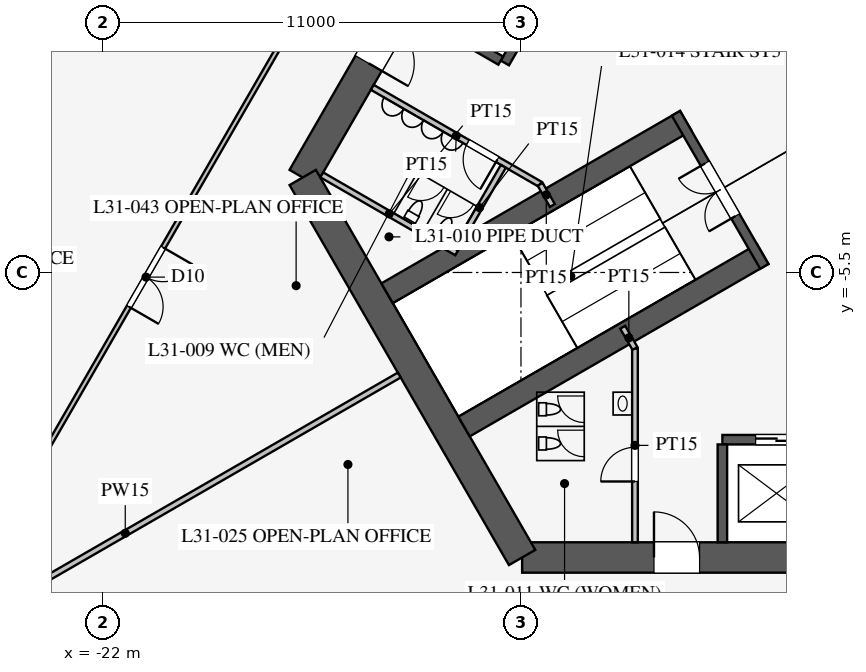
"""IFC4 building model, lengths in metres.
Left out: names, types, materials, properties, quantities, classifications, styles, units other than length and angle.
Written with IfcOpenShell. Run it as: python <this file> out.ifc"""

import sys

from ifc_helpers import new_model, si_unit, direction, frame, frame_2d, origin, place, context, subcontext, project, spatial, rectangle, extrude, element, fill, save


model = new_model("IFC4")
c1 = context("Model", 3, precision=1e-05, world=origin(), true_north=direction((0.0, 1.0)))
c2 = subcontext(c1, "Body", "Model", "MODEL_VIEW")
j1 = project(units=[si_unit("LENGTHUNIT", "METRE"), si_unit("PLANEANGLEUNIT", "RADIAN")], contexts=[c1])
p1 = place(None, origin())
s1 = spatial("IfcSite", under=j1, at=p1, CompositionType="ELEMENT")
p2 = place(p1, origin())
s2 = spatial("IfcBuilding", under=s1, at=p2, CompositionType="ELEMENT")
p3 = place(p2, frame((0.0, 0.0, 136.7)))
s3 = spatial("IfcBuildingStorey", under=s2, at=p3, CompositionType="ELEMENT", Elevation=136.7)
p4 = place(p3, frame((-10.97, -13.0, 0.0), z_axis=(0.0, 0.0, 1.0), x_axis=(1.0, 0.0, 0.0)))
e1 = element("IfcWall", 1, at=p4, inside=s3, PredefinedType="SHEAR", context=c2, shape_type="SweptSolid", body=[
    extrude(rectangle(XDim=21.939, YDim=0.8, at=frame_2d((10.97, 0.0))), origin(), (0.0, 0.0, 1.0), 4.2),
])
p5 = place(p4, frame((17.27, 0.0, 0.0)))
e2 = element("IfcOpeningElement", 2, at=p5, cuts=e1, PredefinedType="OPENING", context=c2, shape_type="SweptSolid", body=[
    extrude(rectangle(XDim=1.2, YDim=2.1, at=frame_2d((0.6, 1.05))), frame((0.0, 0.41, 0.0), z_axis=(0.0, -1.0, 0.0), x_axis=(1.0, 0.0, 0.0)), (0.0, 0.0, 1.0), 0.82),
])
p6 = place(p4, frame((3.47, 0.0, 0.0)))
e3 = element("IfcOpeningElement", 3, at=p6, cuts=e1, PredefinedType="OPENING", context=c2, shape_type="SweptSolid", body=[
    extrude(rectangle(XDim=1.2, YDim=2.1, at=frame_2d((0.6, 1.05))), frame((0.0, 0.41, 0.0), z_axis=(0.0, -1.0, 0.0), x_axis=(1.0, 0.0, 0.0)), (0.0, 0.0, 1.0), 0.82),
])
p7 = place(p3, frame((-5.773, 16.0, 0.0), z_axis=(0.0, 0.0, 1.0), x_axis=(-0.500002442456, -0.866023993627, 0.0)))
e4 = element("IfcWall", 4, at=p7, inside=s3, PredefinedType="SHEAR", context=c2, shape_type="SweptSolid", body=[
    extrude(rectangle(XDim=21.939, YDim=0.8, at=frame_2d((10.97, 0.0))), origin(), (0.0, 0.0, 1.0), 4.2),
])
p8 = place(p7, frame((17.27, 0.0, 0.0)))
e5 = element("IfcOpeningElement", 5, at=p8, cuts=e4, PredefinedType="OPENING", context=c2, shape_type="SweptSolid", body=[
    extrude(rectangle(XDim=1.2, YDim=2.1, at=frame_2d((0.6, 1.05))), frame((0.0, 0.41, 0.0), z_axis=(0.0, -1.0, 0.0), x_axis=(1.0, 0.0, 0.0)), (0.0, 0.0, 1.0), 0.82),
])
p9 = place(p7, frame((3.47, 0.0, 0.0)))
e6 = element("IfcOpeningElement", 6, at=p9, cuts=e4, PredefinedType="OPENING", context=c2, shape_type="SweptSolid", body=[
    extrude(rectangle(XDim=1.2, YDim=2.1, at=frame_2d((0.6, 1.05))), frame((0.0, 0.41, 0.0), z_axis=(0.0, -1.0, 0.0), x_axis=(1.0, 0.0, 0.0)), (0.0, 0.0, 1.0), 0.82),
])
p10 = place(p3, frame((-16.743, -3.0, 0.0), z_axis=(0.0, 0.0, 1.0), x_axis=(0.499995765644, -0.866027848477, 0.0)))
e7 = element("IfcWall", 7, at=p10, inside=s3, PredefinedType="SHEAR", context=c2, shape_type="SweptSolid", body=[
    extrude(rectangle(XDim=11.547, YDim=0.8, at=frame_2d((5.773, 0.0))), origin(), (0.0, 0.0, 1.0), 4.2),
])
p11 = place(p3, frame((-5.7, -9.9, 0.0), z_axis=(0.0, 0.0, 1.0), x_axis=(1.0, 0.0, 0.0)))
e8 = element("IfcWall", 8, at=p11, inside=s3, PredefinedType="SHEAR", context=c2, shape_type="SweptSolid", body=[
    extrude(rectangle(XDim=11.4, YDim=0.25, at=frame_2d((5.7, 0.0))), origin(), (0.0, 0.0, 1.0), 4.2),
])
p12 = place(p11, frame((0.875, 0.0, 0.0)))
e9 = element("IfcOpeningElement", 9, at=p12, cuts=e8, PredefinedType="OPENING", context=c2, shape_type="SweptSolid", body=[
    extrude(rectangle(XDim=1.1, YDim=2.2, at=frame_2d((0.55, 1.1))), frame((0.0, 0.135, 0.0), z_axis=(0.0, -1.0, 0.0), x_axis=(1.0, 0.0, 0.0)), (0.0, 0.0, 1.0), 0.27),
])
p13 = place(p11, frame((3.725, 0.0, 0.0)))
e10 = element("IfcOpeningElement", 10, at=p13, cuts=e8, PredefinedType="OPENING", context=c2, shape_type="SweptSolid", body=[
    extrude(rectangle(XDim=1.1, YDim=2.2, at=frame_2d((0.55, 1.1))), frame((0.0, 0.135, 0.0), z_axis=(0.0, -1.0, 0.0), x_axis=(1.0, 0.0, 0.0)), (0.0, 0.0, 1.0), 0.27),
])
p14 = place(p11, frame((6.575, 0.0, 0.0)))
e11 = element("IfcOpeningElement", 11, at=p14, cuts=e8, PredefinedType="OPENING", context=c2, shape_type="SweptSolid", body=[
    extrude(rectangle(XDim=1.1, YDim=2.2, at=frame_2d((0.55, 1.1))), frame((0.0, 0.135, 0.0), z_axis=(0.0, -1.0, 0.0), x_axis=(1.0, 0.0, 0.0)), (0.0, 0.0, 1.0), 0.27),
])
p15 = place(p11, frame((9.425, 0.0, 0.0)))
e12 = element("IfcOpeningElement", 12, at=p15, cuts=e8, PredefinedType="OPENING", context=c2, shape_type="SweptSolid", body=[
    extrude(rectangle(XDim=1.1, YDim=2.2, at=frame_2d((0.55, 1.1))), frame((0.0, 0.135, 0.0), z_axis=(0.0, -1.0, 0.0), x_axis=(1.0, 0.0, 0.0)), (0.0, 0.0, 1.0), 0.27),
])
p16 = place(p3, frame((-5.7, -10.025, 0.0), z_axis=(0.0, 0.0, 1.0), x_axis=(0.0, -1.0, 0.0)))
e13 = element("IfcWall", 13, at=p16, inside=s3, PredefinedType="SHEAR", context=c2, shape_type="SweptSolid", body=[
    extrude(rectangle(XDim=2.575, YDim=0.25, at=frame_2d((1.288, 0.0))), origin(), (0.0, 0.0, 1.0), 4.2),
])
p17 = place(p3, frame((-5.724, 9.886, 0.0), z_axis=(0.0, 0.0, 1.0), x_axis=(-0.500001763848, -0.866024385424, 0.0)))
e14 = element("IfcWall", 14, at=p17, inside=s3, PredefinedType="SHEAR", context=c2, shape_type="SweptSolid", body=[
    extrude(rectangle(XDim=11.4, YDim=0.25, at=frame_2d((5.7, 0.0))), origin(), (0.0, 0.0, 1.0), 4.2),
])
p18 = place(p17, frame((6.525, 0.0, 0.0)))
e15 = element("IfcOpeningElement", 15, at=p18, cuts=e14, PredefinedType="OPENING", context=c2, shape_type="SweptSolid", body=[
    extrude(rectangle(XDim=1.2, YDim=2.2, at=frame_2d((0.6, 1.1))), frame((0.0, 0.135, 0.0), z_axis=(0.0, -1.0, 0.0), x_axis=(1.0, 0.0, 0.0)), (0.0, 0.0, 1.0), 0.27),
])
p19 = place(p17, frame((9.375, 0.0, 0.0)))
e16 = element("IfcOpeningElement", 16, at=p19, cuts=e14, PredefinedType="OPENING", context=c2, shape_type="SweptSolid", body=[
    extrude(rectangle(XDim=1.2, YDim=2.2, at=frame_2d((0.6, 1.1))), frame((0.0, 0.135, 0.0), z_axis=(0.0, -1.0, 0.0), x_axis=(1.0, 0.0, 0.0)), (0.0, 0.0, 1.0), 0.27),
])
p20 = place(p3, frame((-11.532, 0.076, 0.0), z_axis=(0.0, 0.0, 1.0), x_axis=(-0.866005588531, 0.500034319456, 0.0)))
e17 = element("IfcWall", 17, at=p20, inside=s3, PredefinedType="SHEAR", context=c2, shape_type="SweptSolid", body=[
    extrude(rectangle(XDim=2.575, YDim=0.25, at=frame_2d((1.288, 0.0))), origin(), (0.0, 0.0, 1.0), 4.2),
])
for number, where, z_axis, x_axis in (
    (18, (-6.663, -1.509, 0.0), (0.0, 0.0, 1.0), (-0.866, -0.5, 0.0)),
    (19, (-4.638, -5.016, 0.0), (0.0, 0.0, 1.0), (-0.866, -0.5, 0.0)),
):
    element("IfcWall", number, at=place(p3, frame(where, z_axis=z_axis, x_axis=x_axis)), inside=s3, PredefinedType="SHEAR", context=c2, shape_type="SweptSolid", body=[
        extrude(rectangle(XDim=9.075, YDim=0.6, at=frame_2d((4.538, 0.0))), origin(), (0.0, 0.0, 1.0), 4.2),
    ])
p21 = place(p3, frame((-6.922, -1.312, 0.0), z_axis=(0.0, 0.0, 1.0), x_axis=(0.499984536904, -0.866034331223, 0.0)))
e20 = element("IfcWall", 20, at=p21, inside=s3, PredefinedType="SHEAR", context=c2, shape_type="SweptSolid", body=[
    extrude(rectangle(XDim=4.65, YDim=0.25, at=frame_2d((2.325, 0.0))), origin(), (0.0, 0.0, 1.0), 4.2),
])
p22 = place(p21, frame((1.525, 0.0, 0.0)))
e21 = element("IfcOpeningElement", 21, at=p22, cuts=e20, PredefinedType="OPENING", context=c2, shape_type="SweptSolid", body=[
    extrude(rectangle(XDim=1.6, YDim=2.1, at=frame_2d((0.8, 1.05))), frame((0.0, 0.135, 0.0), z_axis=(0.0, -1.0, 0.0), x_axis=(1.0, 0.0, 0.0)), (0.0, 0.0, 1.0), 0.27),
])
p23 = place(p3, frame((-8.0, -7.5, 0.0), z_axis=(0.0, 0.0, 1.0), x_axis=(0.0, -1.0, 0.0)))
e22 = element("IfcWall", 22, at=p23, inside=s3, PredefinedType="PARTITIONING", context=c2, shape_type="SweptSolid", body=[
    extrude(rectangle(XDim=5.1, YDim=0.15, at=frame_2d((2.55, 0.0))), origin(), (0.0, 0.0, 1.0), 4.0),
])
p24 = place(p23, frame((2.6, 0.0, 0.0)))
e23 = element("IfcOpeningElement", 23, at=p24, cuts=e22, PredefinedType="OPENING", context=c2, shape_type="SweptSolid", body=[
    extrude(rectangle(XDim=0.9, YDim=2.1, at=frame_2d((0.45, 1.05))), frame((0.0, 0.085, 0.0), z_axis=(0.0, -1.0, 0.0), x_axis=(1.0, 0.0, 0.0)), (0.0, 0.0, 1.0), 0.17),
])
p25 = place(p3, frame((-10.495, -3.178, 0.0), z_axis=(0.0, 0.0, 1.0), x_axis=(-0.86602216432, 0.500005610874, 0.0)))
e24 = element("IfcWall", 24, at=p25, inside=s3, PredefinedType="PARTITIONING", context=c2, shape_type="SweptSolid", body=[
    extrude(rectangle(XDim=5.1, YDim=0.15, at=frame_2d((2.55, 0.0))), origin(), (0.0, 0.0, 1.0), 4.0),
])
p26 = place(p25, frame((1.3, 0.0, 0.0)))
e25 = element("IfcOpeningElement", 25, at=p26, cuts=e24, PredefinedType="OPENING", context=c2, shape_type="SweptSolid", body=[
    extrude(rectangle(XDim=0.9, YDim=2.1, at=frame_2d((0.45, 1.05))), frame((0.0, 0.085, 0.0), z_axis=(0.0, -1.0, 0.0), x_axis=(1.0, 0.0, 0.0)), (0.0, 0.0, 1.0), 0.17),
])
for number, where, z_axis, x_axis in (
    (26, (-10.495, -3.178, 0.0), (0.0, 0.0, 1.0), (0.5, -0.866, 0.0)),
    (27, (-8.0, -7.5, 0.0), (0.0, 0.0, 1.0), (-0.5, 0.866, 0.0)),
):
    element("IfcWall", number, at=place(p3, frame(where, z_axis=z_axis, x_axis=x_axis)), inside=s3, PredefinedType="PARTITIONING", context=c2, shape_type="SweptSolid", body=[
        extrude(rectangle(XDim=0.645, YDim=0.15, at=frame_2d((0.323, 0.0))), origin(), (0.0, 0.0, 1.0), 4.0),
    ])
p27 = place(p3, frame((-12.691, -4.982, 0.0), z_axis=(0.0, 0.0, 1.0), x_axis=(-0.8660249478, 0.500000789788, 0.0)))
e28 = element("IfcWall", 28, at=p27, inside=s3, PredefinedType="PARTITIONING", context=c2, shape_type="SweptSolid", body=[
    extrude(rectangle(XDim=4.1, YDim=0.15, at=frame_2d((2.05, 0.0))), origin(), (0.0, 0.0, 1.0), 4.0),
])
p28 = place(p3, frame((-11.464, -2.706, 0.0), z_axis=(0.0, 0.0, 1.0), x_axis=(-0.50001992892, -0.866013897511, 0.0)))
e29 = element("IfcWall", 29, at=p28, inside=s3, PredefinedType="PARTITIONING", context=c2, shape_type="SweptSolid", body=[
    extrude(rectangle(XDim=2.51, YDim=0.15, at=frame_2d((1.255, 0.0))), origin(), (0.0, 0.0, 1.0), 4.0),
])
p29 = place(p3, frame((-14.203, -8.2, 0.0), z_axis=(0.0, 0.0, 1.0), x_axis=(-0.866024668836, -0.500001272966, 0.0)))
e30 = element("IfcWall", 30, at=p29, inside=s3, PredefinedType="PARTITIONING", context=c2, shape_type="SweptSolid", body=[
    extrude(rectangle(XDim=16.65, YDim=0.15, at=frame_2d((8.325, 0.0))), origin(), (0.0, 0.0, 1.0), 2.3),
])
p30 = place(p3, frame((-0.016, 30.491, 0.0), z_axis=(0.0, 0.0, 1.0), x_axis=(-0.50000091641, -0.866024874695, 0.0)))
e31 = element("IfcWall", 31, at=p30, inside=s3, PredefinedType="PARTITIONING", context=c2, shape_type="SweptSolid", body=[
    extrude(rectangle(XDim=52.796, YDim=0.12, at=frame_2d((26.398, 0.0))), origin(), (0.0, 0.0, 1.0), 2.9),
])
p31 = place(p30, frame((10.2, 0.0, 0.15)))
e32 = element("IfcOpeningElement", 32, at=p31, cuts=e31, PredefinedType="OPENING", context=c2, shape_type="SweptSolid", body=[
    extrude(rectangle(XDim=1.8, YDim=2.1, at=frame_2d((0.9, 1.05))), frame((0.0, 0.07, 0.0), z_axis=(0.0, -1.0, 0.0), x_axis=(1.0, 0.0, 0.0)), (0.0, 0.0, 1.0), 0.14),
])
p32 = place(p30, frame((40.8, 0.0, 0.15)))
e33 = element("IfcOpeningElement", 33, at=p32, cuts=e31, PredefinedType="OPENING", context=c2, shape_type="SweptSolid", body=[
    extrude(rectangle(XDim=1.8, YDim=2.1, at=frame_2d((0.9, 1.05))), frame((0.0, 0.07, 0.0), z_axis=(0.0, -1.0, 0.0), x_axis=(1.0, 0.0, 0.0)), (0.0, 0.0, 1.0), 0.14),
])
p33 = place(p24, frame((0.9, 0.0, 0.0), z_axis=(0.0, 0.0, 1.0), x_axis=(-1.0, 0.0, 0.0)))
e34 = element("IfcDoor", 34, at=p33, inside=s3, OperationType="SINGLE_SWING_LEFT", PredefinedType="DOOR", context=c2, shape_type="SweptSolid", body=[
    extrude(rectangle(XDim=0.9, YDim=2.1, at=frame_2d((0.45, 1.05))), frame((0.0, 0.025, 0.0), z_axis=(0.0, -1.0, 0.0), x_axis=(1.0, 0.0, 0.0)), (0.0, 0.0, 1.0), 0.05),
])
fill(e23, e34)
p34 = place(p26, origin())
e35 = element("IfcDoor", 35, at=p34, inside=s3, OperationType="SINGLE_SWING_LEFT", PredefinedType="DOOR", context=c2, shape_type="SweptSolid", body=[
    extrude(rectangle(XDim=0.9, YDim=2.1, at=frame_2d((0.45, 1.05))), frame((0.0, 0.025, 0.0), z_axis=(0.0, -1.0, 0.0), x_axis=(1.0, 0.0, 0.0)), (0.0, 0.0, 1.0), 0.05),
])
fill(e25, e35)
p35 = place(p22, frame((1.6, 0.0, 0.0), z_axis=(0.0, 0.0, 1.0), x_axis=(-1.0, 0.0, 0.0)))
e36 = element("IfcDoor", 36, at=p35, inside=s3, OperationType="DOUBLE_DOOR_SINGLE_SWING", PredefinedType="DOOR", context=c2, shape_type="SweptSolid", body=[
    extrude(rectangle(XDim=1.6, YDim=2.1, at=frame_2d((0.8, 1.05))), frame((0.0, 0.025, 0.0), z_axis=(0.0, -1.0, 0.0), x_axis=(1.0, 0.0, 0.0)), (0.0, 0.0, 1.0), 0.05),
])
fill(e21, e36)
p36 = place(p6, origin())
e37 = element("IfcDoor", 37, at=p36, inside=s3, OperationType="SINGLE_SWING_LEFT", PredefinedType="DOOR", context=c2, shape_type="SweptSolid", body=[
    extrude(rectangle(XDim=1.2, YDim=2.1, at=frame_2d((0.6, 1.05))), frame((0.0, 0.025, 0.0), z_axis=(0.0, -1.0, 0.0), x_axis=(1.0, 0.0, 0.0)), (0.0, 0.0, 1.0), 0.05),
])
fill(e3, e37)
p37 = place(p8, origin())
e38 = element("IfcDoor", 38, at=p37, inside=s3, OperationType="SINGLE_SWING_RIGHT", PredefinedType="DOOR", context=c2, shape_type="SweptSolid", body=[
    extrude(rectangle(XDim=1.2, YDim=2.1, at=frame_2d((0.6, 1.05))), frame((0.0, 0.025, 0.0), z_axis=(0.0, -1.0, 0.0), x_axis=(1.0, 0.0, 0.0)), (0.0, 0.0, 1.0), 0.05),
])
fill(e5, e38)
p38 = place(p32, origin())
e39 = element("IfcDoor", 39, at=p38, inside=s3, OperationType="DOUBLE_DOOR_SINGLE_SWING", PredefinedType="DOOR", context=c2, shape_type="SweptSolid", body=[
    extrude(rectangle(XDim=1.8, YDim=2.1, at=frame_2d((0.9, 1.05))), frame((0.0, 0.025, 0.0), z_axis=(0.0, -1.0, 0.0), x_axis=(1.0, 0.0, 0.0)), (0.0, 0.0, 1.0), 0.05),
])
fill(e33, e39)
p39 = place(p12, origin())
e40 = element("IfcDoor", 40, at=p39, inside=s3, OperationType="DOUBLE_DOOR_SLIDING", PredefinedType="DOOR", context=c2, shape_type="SweptSolid", body=[
    extrude(rectangle(XDim=1.1, YDim=2.2, at=frame_2d((0.55, 1.1))), frame((0.0, 0.025, 0.0), z_axis=(0.0, -1.0, 0.0), x_axis=(1.0, 0.0, 0.0)), (0.0, 0.0, 1.0), 0.05),
])
fill(e9, e40)
save(model, sys.argv[1])
